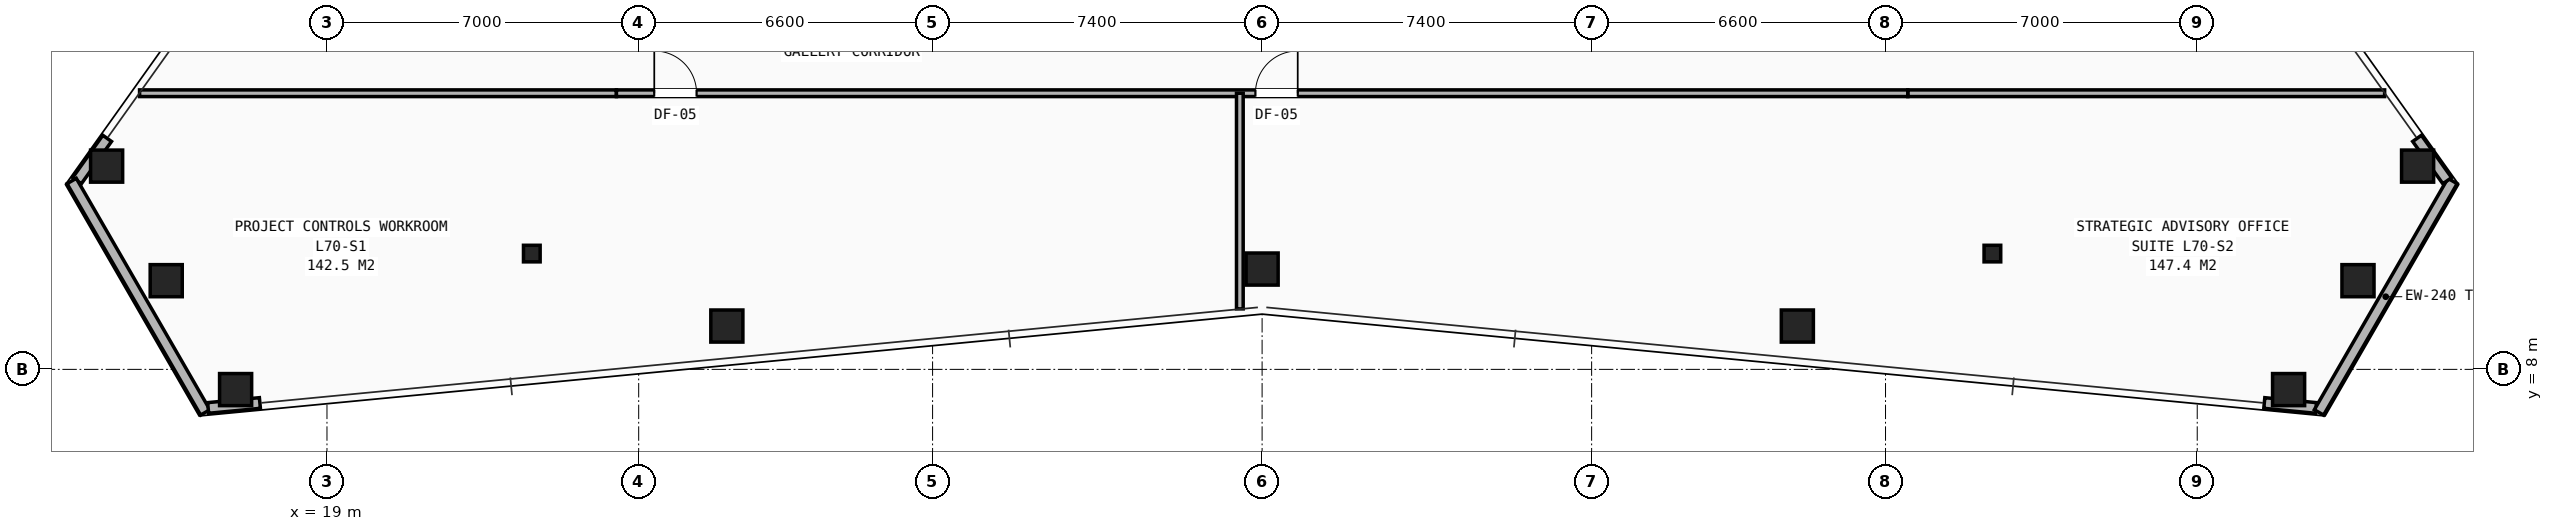
"""IFC4 building model, lengths in metres.
Left out: names, types, materials, properties, quantities, classifications, styles, units other than length and angle.
Written with IfcOpenShell. Run it as: python <this file> out.ifc"""

import sys

from ifc_helpers import new_model, si_unit, direction, frame, frame_2d, origin, origin_2d, place, context, subcontext, project, spatial, rectangle, hollow_rectangle, i_section, extrude, element, fill, save


model = new_model("IFC4")
c1 = context("Model", 3, precision=1e-05, world=origin(), true_north=direction((0.0, 1.0)))
c2 = subcontext(c1, "Body", "Model", "MODEL_VIEW")
j1 = project(units=[si_unit("LENGTHUNIT", "METRE"), si_unit("PLANEANGLEUNIT", "RADIAN")], contexts=[c1])
p1 = place(None, origin())
s1 = spatial("IfcSite", under=j1, at=p1, CompositionType="ELEMENT")
p2 = place(p1, origin())
s2 = spatial("IfcBuilding", under=s1, at=p2, CompositionType="ELEMENT")
p3 = place(p2, frame((0.0, 0.0, 246.9)))
s3 = spatial("IfcBuildingStorey", under=s2, at=p3, CompositionType="ELEMENT", Elevation=246.9)
for number, where, z_axis, x_axis in (
    (1, (23.6, 10.6, 0.0), (0.0, 0.0, 1.0), (1.0, 0.0, 0.0)),
    (2, (56.4, 10.6, 0.0), (0.0, 0.0, 1.0), (1.0, 0.0, 0.0)),
):
    element("IfcColumn", number, at=place(p3, frame(where, z_axis=z_axis, x_axis=x_axis)), inside=s3, PredefinedType="COLUMN", context=c2, shape_type="SweptSolid", body=[
        extrude(i_section(OverallWidth=0.374, OverallDepth=0.372, WebThickness=0.016, FlangeThickness=0.026, at=origin_2d()), origin(), (0.0, 0.0, 1.0), 3.5),
    ])
for number, where, z_axis, x_axis in (
    (3, (14.051, 12.564, 0.0), (0.0, 0.0, 1.0), (1.0, 0.0, 0.0)),
    (4, (15.39, 9.991, 0.0), (0.0, 0.0, 1.0), (1.0, 0.0, 0.0)),
    (5, (16.948, 7.546, 0.0), (0.0, 0.0, 1.0), (1.0, 0.0, 0.0)),
    (6, (27.98, 8.973, 0.0), (0.0, 0.0, 1.0), (1.0, 0.0, 0.0)),
    (7, (40.0, 10.252, 0.0), (0.0, 0.0, 1.0), (1.0, 0.0, 0.0)),
    (8, (52.02, 8.973, 0.0), (0.0, 0.0, 1.0), (1.0, 0.0, 0.0)),
    (9, (63.052, 7.546, 0.0), (0.0, 0.0, 1.0), (1.0, 0.0, 0.0)),
    (10, (64.61, 9.991, 0.0), (0.0, 0.0, 1.0), (1.0, 0.0, 0.0)),
    (11, (65.949, 12.564, 0.0), (0.0, 0.0, 1.0), (1.0, 0.0, 0.0)),
):
    element("IfcColumn", number, at=place(p3, frame(where, z_axis=z_axis, x_axis=x_axis)), inside=s3, PredefinedType="COLUMN", context=c2, shape_type="SweptSolid", body=[
        extrude(hollow_rectangle(XDim=0.72, YDim=0.72, WallThickness=0.05, at=origin_2d()), origin(), (0.0, 0.0, 1.0), 3.5),
    ])
p4 = place(p3, frame((14.063, 13.187, 0.0), z_axis=(0.0, 0.0, 1.0), x_axis=(-0.580347612152, -0.814368865484, 0.0)))
e12 = element("IfcWall", 12, at=p4, inside=s3, PredefinedType="SHEAR", context=c2, shape_type="SweptSolid", body=[
    extrude(rectangle(XDim=1.167, YDim=0.24, at=frame_2d((0.584, 0.0))), origin(), (0.0, 0.0, 1.0), 2.573),
])
p5 = place(p3, frame((16.267, 7.033, 0.0), z_axis=(0.0, 0.0, 1.0), x_axis=(-0.499990139034, 0.866031096941, 0.0)))
e13 = element("IfcWall", 13, at=p5, inside=s3, PredefinedType="SHEAR", context=c2, shape_type="SweptSolid", body=[
    extrude(rectangle(XDim=6.0, YDim=0.24, at=frame_2d((3.0, 0.0))), origin(), (0.0, 0.0, 1.0), 2.573),
])
for number, where, z_axis, x_axis in (
    (14, (16.332, 7.134, 0.0), (0.0, 0.0, 1.0), (0.995, 0.095, 0.0)),
    (15, (62.506, 7.245, 0.0), (0.0, 0.0, 1.0), (0.995, -0.095, 0.0)),
):
    element("IfcWall", number, at=place(p3, frame(where, z_axis=z_axis, x_axis=x_axis)), inside=s3, PredefinedType="SHEAR", context=c2, shape_type="SweptSolid", body=[
        extrude(rectangle(XDim=1.167, YDim=0.24, at=frame_2d((0.584, 0.0))), origin(), (0.0, 0.0, 1.0), 2.573),
    ])
p6 = place(p3, frame((66.733, 12.229, 0.0), z_axis=(0.0, 0.0, 1.0), x_axis=(-0.499990139034, -0.866031096941, 0.0)))
e16 = element("IfcWall", 16, at=p6, inside=s3, PredefinedType="SHEAR", context=c2, shape_type="SweptSolid", body=[
    extrude(rectangle(XDim=6.0, YDim=0.24, at=frame_2d((3.0, 0.0))), origin(), (0.0, 0.0, 1.0), 2.573),
])
p7 = place(p3, frame((66.614, 12.236, 0.0), z_axis=(0.0, 0.0, 1.0), x_axis=(-0.580347612152, 0.814368865484, 0.0)))
e17 = element("IfcWall", 17, at=p7, inside=s3, PredefinedType="SHEAR", context=c2, shape_type="SweptSolid", body=[
    extrude(rectangle(XDim=1.167, YDim=0.24, at=frame_2d((0.584, 0.0))), origin(), (0.0, 0.0, 1.0), 2.573),
])
for number, where, z_axis, x_axis in (
    (18, (14.792, 14.2, 0.0), (0.0, 0.0, 1.0), (1.0, 0.0, 0.0)),
    (19, (54.5, 14.2, 0.0), (0.0, 0.0, 1.0), (1.0, 0.0, 0.0)),
):
    element("IfcWall", number, at=place(p3, frame(where, z_axis=z_axis, x_axis=x_axis)), inside=s3, PredefinedType="PARTITIONING", context=c2, shape_type="SweptSolid", body=[
        extrude(rectangle(XDim=10.708, YDim=0.15, at=frame_2d((5.354, 0.0))), origin(), (0.0, 0.0, 1.0), 2.215),
    ])
p8 = place(p3, frame((25.5, 14.2, 0.0), z_axis=(0.0, 0.0, 1.0), x_axis=(1.0, 0.0, 0.0)))
e20 = element("IfcWall", 20, at=p8, inside=s3, PredefinedType="PARTITIONING", context=c2, shape_type="SweptSolid", body=[
    extrude(rectangle(XDim=29.0, YDim=0.15, at=frame_2d((14.5, 0.0))), origin(), (0.0, 0.0, 1.0), 2.215),
])
p9 = place(p8, frame((0.85, 0.0, 0.0)))
e21 = element("IfcOpeningElement", 21, at=p9, cuts=e20, PredefinedType="OPENING", context=c2, shape_type="SweptSolid", body=[
    extrude(rectangle(XDim=0.95, YDim=2.1, at=frame_2d((0.475, 1.05))), frame((0.0, 0.085, 0.0), z_axis=(0.0, -1.0, 0.0), x_axis=(1.0, 0.0, 0.0)), (0.0, 0.0, 1.0), 0.17),
])
p10 = place(p8, frame((14.35, 0.0, 0.0)))
e22 = element("IfcOpeningElement", 22, at=p10, cuts=e20, PredefinedType="OPENING", context=c2, shape_type="SweptSolid", body=[
    extrude(rectangle(XDim=0.95, YDim=2.1, at=frame_2d((0.475, 1.05))), frame((0.0, 0.085, 0.0), z_axis=(0.0, -1.0, 0.0), x_axis=(1.0, 0.0, 0.0)), (0.0, 0.0, 1.0), 0.17),
])
p11 = place(p3, frame((39.5, 9.358, 0.0), z_axis=(0.0, 0.0, 1.0), x_axis=(0.0, 1.0, 0.0)))
e23 = element("IfcWall", 23, at=p11, inside=s3, PredefinedType="PARTITIONING", context=c2, shape_type="SweptSolid", body=[
    extrude(rectangle(XDim=4.842, YDim=0.15, at=frame_2d((2.421, 0.0))), origin(), (0.0, 0.0, 1.0), 2.215),
])
p12 = place(p9, origin())
e24 = element("IfcDoor", 24, at=p12, inside=s3, OperationType="SINGLE_SWING_LEFT", PredefinedType="DOOR", context=c2, shape_type="SweptSolid", body=[
    extrude(rectangle(XDim=0.95, YDim=2.1, at=frame_2d((0.475, 1.05))), frame((0.0, 0.025, 0.0), z_axis=(0.0, -1.0, 0.0), x_axis=(1.0, 0.0, 0.0)), (0.0, 0.0, 1.0), 0.05),
])
fill(e21, e24)
p13 = place(p10, origin())
e25 = element("IfcDoor", 25, at=p13, inside=s3, OperationType="SINGLE_SWING_RIGHT", PredefinedType="DOOR", context=c2, shape_type="SweptSolid", body=[
    extrude(rectangle(XDim=0.95, YDim=2.1, at=frame_2d((0.475, 1.05))), frame((0.0, 0.025, 0.0), z_axis=(0.0, -1.0, 0.0), x_axis=(1.0, 0.0, 0.0)), (0.0, 0.0, 1.0), 0.05),
])
fill(e22, e25)
save(model, sys.argv[1])
